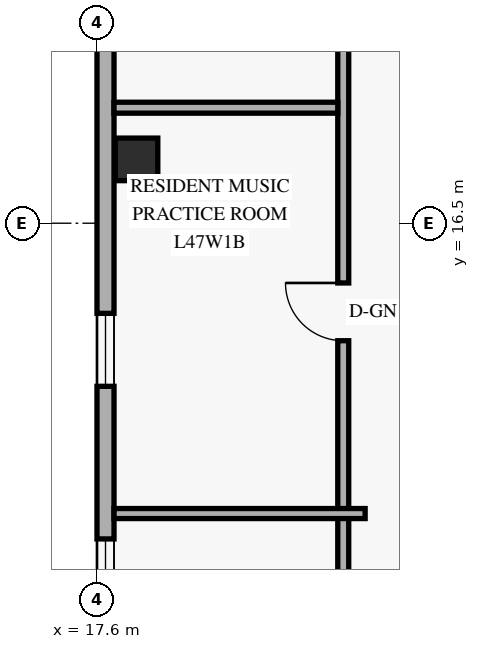
"""IFC4 building model, lengths in metres.
Left out: names, types, materials, properties, quantities, classifications, styles, units other than length and angle.
Written with IfcOpenShell. Run it as: python <this file> out.ifc"""

import sys

from ifc_helpers import new_model, si_unit, direction, frame, frame_2d, origin, origin_2d, place, context, subcontext, project, spatial, rectangle, extrude, element, fill, save


model = new_model("IFC4")
c1 = context("Model", 3, precision=1e-05, world=origin(), true_north=direction((0.0, 1.0)))
c2 = subcontext(c1, "Body", "Model", "MODEL_VIEW")
j1 = project(units=[si_unit("LENGTHUNIT", "METRE"), si_unit("PLANEANGLEUNIT", "RADIAN")], contexts=[c1])
p1 = place(None, origin())
s1 = spatial("IfcSite", under=j1, at=p1, CompositionType="ELEMENT")
p2 = place(p1, origin())
s2 = spatial("IfcBuilding", under=s1, at=p2, CompositionType="ELEMENT")
p3 = place(p2, frame((0.0, 0.0, 181.2)))
s3 = spatial("IfcBuildingStorey", under=s2, at=p3, CompositionType="ELEMENT", Elevation=181.2)
p4 = place(p3, frame((18.25, 17.55, 0.0), z_axis=(0.0, 0.0, 1.0), x_axis=(1.0, 0.0, 0.0)))
e1 = element("IfcColumn", 1, at=p4, inside=s3, PredefinedType="COLUMN", context=c2, shape_type="SweptSolid", body=[
    extrude(rectangle(XDim=0.7, YDim=0.7, at=origin_2d()), origin(), (0.0, 0.0, 1.0), 3.6),
])
p5 = place(p3, frame((17.74, 40.38, 0.0), z_axis=(0.0, 0.0, 1.0), x_axis=(0.0, -1.0, 0.0)))
e2 = element("IfcWall", 2, at=p5, inside=s3, PredefinedType="SOLIDWALL", context=c2, shape_type="SweptSolid", body=[
    extrude(rectangle(XDim=32.76, YDim=0.28, at=frame_2d((16.38, 0.0))), origin(), (0.0, 0.0, 1.0), 3.36),
])
p6 = place(p5, frame((29.073, 0.0, 0.85)))
e3 = element("IfcOpeningElement", 3, at=p6, cuts=e2, PredefinedType="OPENING", context=c2, shape_type="SweptSolid", body=[
    extrude(rectangle(XDim=1.2, YDim=1.5, at=frame_2d((0.6, 0.75))), frame((0.0, 0.15, 0.0), z_axis=(0.0, -1.0, 0.0), x_axis=(1.0, 0.0, 0.0)), (0.0, 0.0, 1.0), 0.3),
])
p7 = place(p5, frame((25.363, 0.0, 0.85)))
e4 = element("IfcOpeningElement", 4, at=p7, cuts=e2, PredefinedType="OPENING", context=c2, shape_type="SweptSolid", body=[
    extrude(rectangle(XDim=1.2, YDim=1.5, at=frame_2d((0.6, 0.75))), frame((0.0, 0.15, 0.0), z_axis=(0.0, -1.0, 0.0), x_axis=(1.0, 0.0, 0.0)), (0.0, 0.0, 1.0), 0.3),
])
p8 = place(p5, frame((15.7, 0.0, 0.85)))
e5 = element("IfcOpeningElement", 5, at=p8, cuts=e2, PredefinedType="OPENING", context=c2, shape_type="SweptSolid", body=[
    extrude(rectangle(XDim=1.2, YDim=1.5, at=frame_2d((0.6, 0.75))), frame((0.0, 0.15, 0.0), z_axis=(0.0, -1.0, 0.0), x_axis=(1.0, 0.0, 0.0)), (0.0, 0.0, 1.0), 0.3),
])
p9 = place(p5, frame((5.288, 0.0, 0.85)))
e6 = element("IfcOpeningElement", 6, at=p9, cuts=e2, PredefinedType="OPENING", context=c2, shape_type="SweptSolid", body=[
    extrude(rectangle(XDim=1.2, YDim=1.5, at=frame_2d((0.6, 0.75))), frame((0.0, 0.15, 0.0), z_axis=(0.0, -1.0, 0.0), x_axis=(1.0, 0.0, 0.0)), (0.0, 0.0, 1.0), 0.3),
])
p10 = place(p3, frame((21.65, 6.8, 0.0), z_axis=(0.0, 0.0, 1.0), x_axis=(0.0, 1.0, 0.0)))
e7 = element("IfcWall", 7, at=p10, inside=s3, PredefinedType="STANDARD", context=c2, shape_type="SweptSolid", body=[
    extrude(rectangle(XDim=34.4, YDim=0.18, at=frame_2d((17.2, 0.0))), origin(), (0.0, 0.0, 1.0), 2.73),
])
p11 = place(p10, frame((0.732, 0.0, 0.0)))
e8 = element("IfcOpeningElement", 8, at=p11, cuts=e7, PredefinedType="OPENING", context=c2, shape_type="SweptSolid", body=[
    extrude(rectangle(XDim=0.95, YDim=2.15, at=frame_2d((0.475, 1.075))), frame((0.0, 0.1, 0.0), z_axis=(0.0, -1.0, 0.0), x_axis=(1.0, 0.0, 0.0)), (0.0, 0.0, 1.0), 0.2),
])
p12 = place(p10, frame((7.768, 0.0, 0.0)))
e9 = element("IfcOpeningElement", 9, at=p12, cuts=e7, PredefinedType="OPENING", context=c2, shape_type="SweptSolid", body=[
    extrude(rectangle(XDim=0.95, YDim=2.15, at=frame_2d((0.475, 1.075))), frame((0.0, 0.1, 0.0), z_axis=(0.0, -1.0, 0.0), x_axis=(1.0, 0.0, 0.0)), (0.0, 0.0, 1.0), 0.2),
])
p13 = place(p10, frame((17.333, 0.0, 0.0)))
e10 = element("IfcOpeningElement", 10, at=p13, cuts=e7, PredefinedType="OPENING", context=c2, shape_type="SweptSolid", body=[
    extrude(rectangle(XDim=0.95, YDim=2.15, at=frame_2d((0.475, 1.075))), frame((0.0, 0.1, 0.0), z_axis=(0.0, -1.0, 0.0), x_axis=(1.0, 0.0, 0.0)), (0.0, 0.0, 1.0), 0.2),
])
p14 = place(p10, frame((29.968, 0.0, 0.0)))
e11 = element("IfcOpeningElement", 11, at=p14, cuts=e7, PredefinedType="OPENING", context=c2, shape_type="SweptSolid", body=[
    extrude(rectangle(XDim=0.95, YDim=2.15, at=frame_2d((0.475, 1.075))), frame((0.0, 0.1, 0.0), z_axis=(0.0, -1.0, 0.0), x_axis=(1.0, 0.0, 0.0)), (0.0, 0.0, 1.0), 0.2),
])
p15 = place(p3, frame((17.88, 11.725, 0.0), z_axis=(0.0, 0.0, 1.0), x_axis=(1.0, 0.0, 0.0)))
e12 = element("IfcWall", 12, at=p15, inside=s3, PredefinedType="PARTITIONING", context=c2, shape_type="SweptSolid", body=[
    extrude(rectangle(XDim=4.13, YDim=0.165, at=frame_2d((2.065, 0.0))), origin(), (0.0, 0.0, 1.0), 2.879),
])
p16 = place(p3, frame((17.88, 18.4, 0.0), z_axis=(0.0, 0.0, 1.0), x_axis=(1.0, 0.0, 0.0)))
e13 = element("IfcWall", 13, at=p16, inside=s3, PredefinedType="PARTITIONING", context=c2, shape_type="SweptSolid", body=[
    extrude(rectangle(XDim=3.68, YDim=0.18, at=frame_2d((1.84, 0.0))), origin(), (0.0, 0.0, 1.0), 2.879),
])
p17 = place(p6, origin())
e14 = element("IfcWindow", 14, at=p17, inside=s3, PartitioningType="SINGLE_PANEL", PredefinedType="WINDOW", context=c2, shape_type="SweptSolid", body=[
    extrude(rectangle(XDim=1.2, YDim=1.5, at=frame_2d((0.6, 0.75))), frame((0.0, 0.03, 0.0), z_axis=(0.0, -1.0, 0.0), x_axis=(1.0, 0.0, 0.0)), (0.0, 0.0, 1.0), 0.06),
])
fill(e3, e14)
p18 = place(p7, origin())
e15 = element("IfcWindow", 15, at=p18, inside=s3, PartitioningType="SINGLE_PANEL", PredefinedType="WINDOW", context=c2, shape_type="SweptSolid", body=[
    extrude(rectangle(XDim=1.2, YDim=1.5, at=frame_2d((0.6, 0.75))), frame((0.0, 0.03, 0.0), z_axis=(0.0, -1.0, 0.0), x_axis=(1.0, 0.0, 0.0)), (0.0, 0.0, 1.0), 0.06),
])
fill(e4, e15)
p19 = place(p12, origin())
e16 = element("IfcDoor", 16, at=p19, inside=s3, OperationType="SINGLE_SWING_RIGHT", PredefinedType="DOOR", context=c2, shape_type="SweptSolid", body=[
    extrude(rectangle(XDim=0.95, YDim=2.15, at=frame_2d((0.475, 1.075))), frame((0.0, 0.025, 0.0), z_axis=(0.0, -1.0, 0.0), x_axis=(1.0, 0.0, 0.0)), (0.0, 0.0, 1.0), 0.05),
])
fill(e9, e16)
save(model, sys.argv[1])
